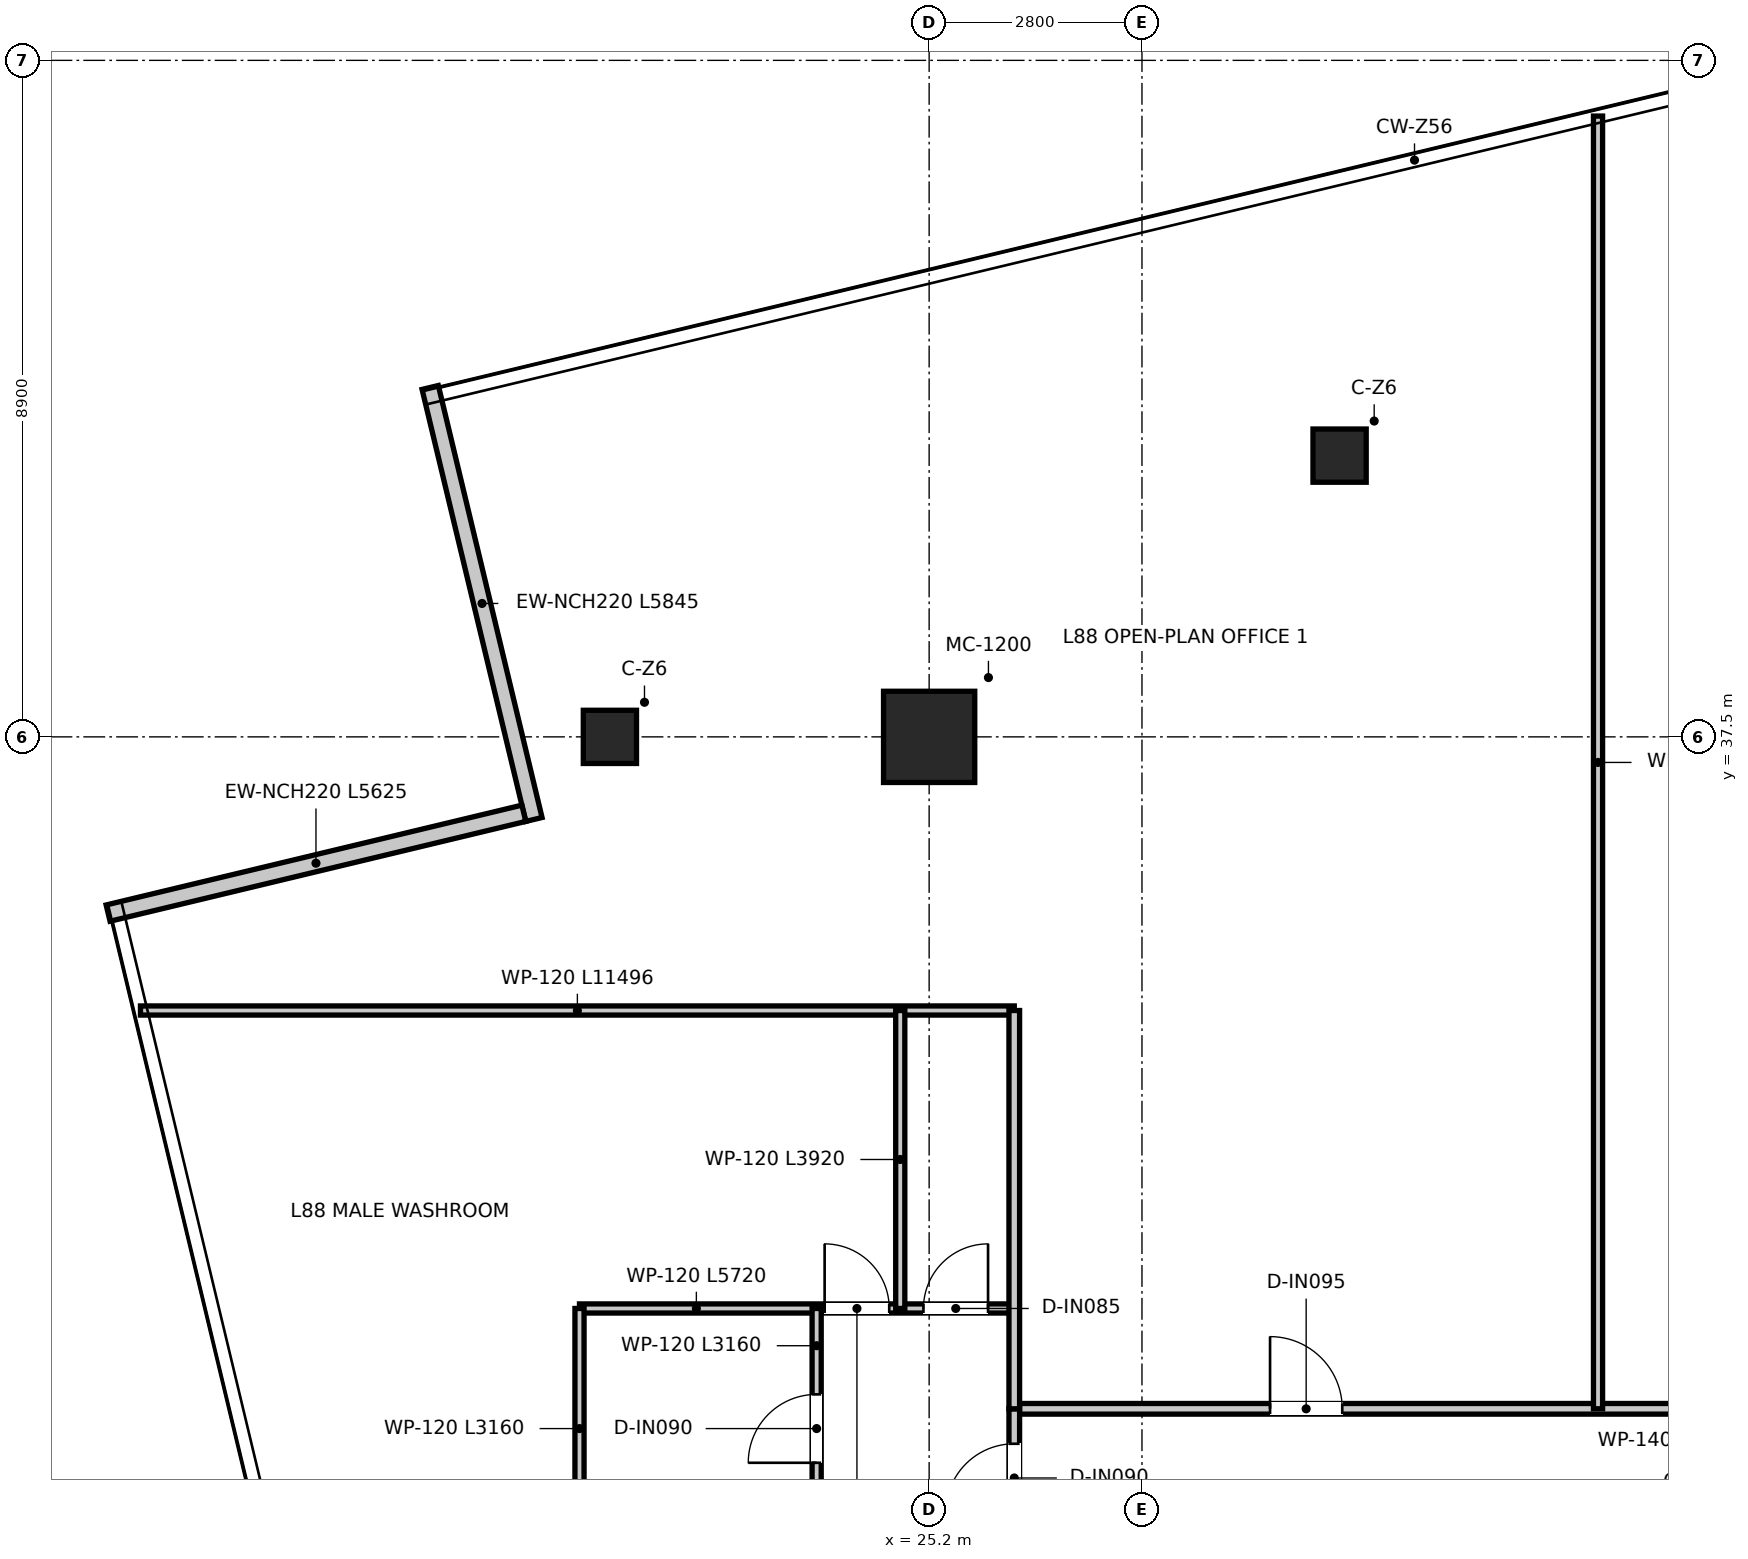
"""IFC4 building model, lengths in metres.
Left out: names, types, materials, properties, quantities, classifications, styles, units other than length and angle.
Written with IfcOpenShell. Run it as: python <this file> out.ifc"""

import sys

from ifc_helpers import new_model, si_unit, direction, frame, frame_2d, origin, origin_2d, place, context, subcontext, project, spatial, rectangle, extrude, source, transform, mapped, element, fill, save


model = new_model("IFC4")
c1 = context("Model", 3, precision=1e-05, world=origin(), true_north=direction((0.0, 1.0)))
c2 = subcontext(c1, "Body", "Model", "MODEL_VIEW")
j1 = project(units=[si_unit("LENGTHUNIT", "METRE"), si_unit("PLANEANGLEUNIT", "RADIAN")], contexts=[c1])
p1 = place(None, origin())
s1 = spatial("IfcSite", under=j1, at=p1, CompositionType="ELEMENT")
p2 = place(p1, origin())
s2 = spatial("IfcBuilding", under=s1, at=p2, CompositionType="ELEMENT")
p3 = place(p2, frame((0.0, 0.0, 359.3)))
s3 = spatial("IfcBuildingStorey", under=s2, at=p3, CompositionType="ELEMENT", Elevation=359.3)
m1 = source(origin(), c2, "Body", "SweptSolid", [
    extrude(rectangle(XDim=1.2, YDim=1.2, at=origin_2d()), origin(), (0.0, 0.0, 1.0), 3.95),
])
p4 = place(p3, frame((25.2, 37.5, 0.0), z_axis=(0.0, 0.0, 1.0), x_axis=(1.0, 0.0, 0.0)))
e1 = element("IfcColumn", 1, at=p4, inside=s3, PredefinedType="USERDEFINED", context=c2, shape_type="MappedRepresentation", body=[
    mapped(m1, transform((0.0, 0.0, 0.0), x_axis=(1.0, 0.0, 0.0), y_axis=(0.0, 1.0, 0.0), z_axis=(0.0, 0.0, 1.0), scale=1.0)),
])
m2 = source(origin(), c2, "Body", "SweptSolid", [
    extrude(rectangle(XDim=0.7, YDim=0.7, at=origin_2d()), origin(), (0.0, 0.0, 1.0), 3.95),
])
for number, where, z_axis, x_axis in (
    (2, (21.0, 37.5, 0.0), (0.0, 0.0, 1.0), (1.0, 0.0, 0.0)),
    (3, (30.6, 41.2, 0.0), (0.0, 0.0, 1.0), (1.0, 0.0, 0.0)),
):
    element("IfcColumn", number, at=place(p3, frame(where, z_axis=z_axis, x_axis=x_axis)), inside=s3, PredefinedType="COLUMN", context=c2, shape_type="MappedRepresentation", body=[
        mapped(m2, transform((0.0, 0.0, 0.0), x_axis=(1.0, 0.0, 0.0), y_axis=(0.0, 1.0, 0.0), z_axis=(0.0, 0.0, 1.0), scale=1.0)),
    ])
p5 = place(p3, frame((18.636, 42.097, 0.0), z_axis=(0.0, 0.0, 1.0), x_axis=(0.233444040416, -0.972370238126, 0.0)))
e4 = element("IfcWall", 4, at=p5, inside=s3, PredefinedType="ELEMENTEDWALL", context=c2, shape_type="SweptSolid", body=[
    extrude(rectangle(XDim=5.845, YDim=0.22, at=frame_2d((2.922, 0.0))), origin(), (0.0, 0.0, 1.0), 3.6),
])
p6 = place(p3, frame((19.868, 36.495, 0.0), z_axis=(0.0, 0.0, 1.0), x_axis=(-0.972364840687, -0.233466521361, 0.0)))
e5 = element("IfcWall", 5, at=p6, inside=s3, PredefinedType="ELEMENTEDWALL", context=c2, shape_type="SweptSolid", body=[
    extrude(rectangle(XDim=5.625, YDim=0.22, at=frame_2d((2.812, 0.0))), origin(), (0.0, 0.0, 1.0), 3.6),
])
p7 = place(p3, frame((26.32, 28.66, 0.0), z_axis=(0.0, 0.0, 1.0), x_axis=(1.0, 0.0, 0.0)))
e6 = element("IfcWall", 6, at=p7, inside=s3, PredefinedType="PARTITIONING", context=c2, shape_type="SweptSolid", body=[
    extrude(rectangle(XDim=19.36, YDim=0.14, at=frame_2d((9.68, 0.0))), origin(), (0.0, 0.0, 1.0), 3.11),
])
p8 = place(p7, frame((3.365, 0.0, 0.0)))
e7 = element("IfcOpeningElement", 7, at=p8, cuts=e6, PredefinedType="OPENING", context=c2, shape_type="SweptSolid", body=[
    extrude(rectangle(XDim=0.95, YDim=2.1, at=frame_2d((0.475, 1.05))), frame((0.0, 0.08, 0.0), z_axis=(0.0, -1.0, 0.0), x_axis=(1.0, 0.0, 0.0)), (0.0, 0.0, 1.0), 0.16),
])
p9 = place(p7, frame((13.045, 0.0, 0.0)))
e8 = element("IfcOpeningElement", 8, at=p9, cuts=e6, PredefinedType="OPENING", context=c2, shape_type="SweptSolid", body=[
    extrude(rectangle(XDim=0.95, YDim=2.1, at=frame_2d((0.475, 1.05))), frame((0.0, 0.08, 0.0), z_axis=(0.0, -1.0, 0.0), x_axis=(1.0, 0.0, 0.0)), (0.0, 0.0, 1.0), 0.16),
])
p10 = place(p3, frame((26.32, 13.0, 0.0), z_axis=(0.0, 0.0, 1.0), x_axis=(0.0, 1.0, 0.0)))
e9 = element("IfcWall", 9, at=p10, inside=s3, PredefinedType="PARTITIONING", context=c2, shape_type="SweptSolid", body=[
    extrude(rectangle(XDim=15.66, YDim=0.14, at=frame_2d((7.83, 0.0))), origin(), (0.0, 0.0, 1.0), 3.06),
])
p11 = place(p10, frame((14.3, 0.0, 0.0)))
e10 = element("IfcOpeningElement", 10, at=p11, cuts=e9, PredefinedType="OPENING", context=c2, shape_type="SweptSolid", body=[
    extrude(rectangle(XDim=0.9, YDim=2.1, at=frame_2d((0.45, 1.05))), frame((0.0, 0.08, 0.0), z_axis=(0.0, -1.0, 0.0), x_axis=(1.0, 0.0, 0.0)), (0.0, 0.0, 1.0), 0.16),
])
p12 = place(p10, frame((6.55, 0.0, 0.0)))
e11 = element("IfcOpeningElement", 11, at=p12, cuts=e9, PredefinedType="OPENING", context=c2, shape_type="SweptSolid", body=[
    extrude(rectangle(XDim=0.9, YDim=2.1, at=frame_2d((0.45, 1.05))), frame((0.0, 0.08, 0.0), z_axis=(0.0, -1.0, 0.0), x_axis=(1.0, 0.0, 0.0)), (0.0, 0.0, 1.0), 0.16),
])
p13 = place(p10, frame((11.21, 0.0, 0.0)))
e12 = element("IfcOpeningElement", 12, at=p13, cuts=e9, PredefinedType="OPENING", context=c2, shape_type="SweptSolid", body=[
    extrude(rectangle(XDim=0.9, YDim=2.1, at=frame_2d((0.45, 1.05))), frame((0.0, 0.08, 0.0), z_axis=(0.0, -1.0, 0.0), x_axis=(1.0, 0.0, 0.0)), (0.0, 0.0, 1.0), 0.16),
])
p14 = place(p3, frame((14.824, 33.9, 0.0), z_axis=(0.0, 0.0, 1.0), x_axis=(1.0, 0.0, 0.0)))
e13 = element("IfcWall", 13, at=p14, inside=s3, PredefinedType="PARTITIONING", context=c2, shape_type="SweptSolid", body=[
    extrude(rectangle(XDim=11.496, YDim=0.12, at=frame_2d((5.748, 0.0))), origin(), (0.0, 0.0, 1.0), 3.06),
])
p15 = place(p3, frame((20.6, 29.98, 0.0), z_axis=(0.0, 0.0, 1.0), x_axis=(1.0, 0.0, 0.0)))
e14 = element("IfcWall", 14, at=p15, inside=s3, PredefinedType="PARTITIONING", context=c2, shape_type="SweptSolid", body=[
    extrude(rectangle(XDim=5.72, YDim=0.12, at=frame_2d((2.86, 0.0))), origin(), (0.0, 0.0, 1.0), 3.06),
])
p16 = place(p15, frame((3.225, 0.0, 0.0)))
e15 = element("IfcOpeningElement", 15, at=p16, cuts=e14, PredefinedType="OPENING", context=c2, shape_type="SweptSolid", body=[
    extrude(rectangle(XDim=0.85, YDim=2.1, at=frame_2d((0.425, 1.05))), frame((0.0, 0.07, 0.0), z_axis=(0.0, -1.0, 0.0), x_axis=(1.0, 0.0, 0.0)), (0.0, 0.0, 1.0), 0.14),
])
p17 = place(p15, frame((4.525, 0.0, 0.0)))
e16 = element("IfcOpeningElement", 16, at=p17, cuts=e14, PredefinedType="OPENING", context=c2, shape_type="SweptSolid", body=[
    extrude(rectangle(XDim=0.85, YDim=2.1, at=frame_2d((0.425, 1.05))), frame((0.0, 0.07, 0.0), z_axis=(0.0, -1.0, 0.0), x_axis=(1.0, 0.0, 0.0)), (0.0, 0.0, 1.0), 0.14),
])
p18 = place(p3, frame((20.6, 26.82, 0.0), z_axis=(0.0, 0.0, 1.0), x_axis=(0.0, 1.0, 0.0)))
e17 = element("IfcWall", 17, at=p18, inside=s3, PredefinedType="PARTITIONING", context=c2, shape_type="SweptSolid", body=[
    extrude(rectangle(XDim=3.16, YDim=0.12, at=frame_2d((1.58, 0.0))), origin(), (0.0, 0.0, 1.0), 3.6),
])
p19 = place(p3, frame((23.72, 26.82, 0.0), z_axis=(0.0, 0.0, 1.0), x_axis=(0.0, 1.0, 0.0)))
e18 = element("IfcWall", 18, at=p19, inside=s3, PredefinedType="PARTITIONING", context=c2, shape_type="SweptSolid", body=[
    extrude(rectangle(XDim=3.16, YDim=0.12, at=frame_2d((1.58, 0.0))), origin(), (0.0, 0.0, 1.0), 3.11),
])
p20 = place(p19, frame((1.13, 0.0, 0.0)))
e19 = element("IfcOpeningElement", 19, at=p20, cuts=e18, PredefinedType="OPENING", context=c2, shape_type="SweptSolid", body=[
    extrude(rectangle(XDim=0.9, YDim=2.1, at=frame_2d((0.45, 1.05))), frame((0.0, 0.07, 0.0), z_axis=(0.0, -1.0, 0.0), x_axis=(1.0, 0.0, 0.0)), (0.0, 0.0, 1.0), 0.14),
])
p21 = place(p3, frame((24.82, 29.98, 0.0), z_axis=(0.0, 0.0, 1.0), x_axis=(0.0, 1.0, 0.0)))
e20 = element("IfcWall", 20, at=p21, inside=s3, PredefinedType="PARTITIONING", context=c2, shape_type="SweptSolid", body=[
    extrude(rectangle(XDim=3.92, YDim=0.12, at=frame_2d((1.96, 0.0))), origin(), (0.0, 0.0, 1.0), 3.3),
])
p22 = place(p3, frame((26.32, 28.66, 0.0), z_axis=(0.0, 0.0, 1.0), x_axis=(0.0, 1.0, 0.0)))
e21 = element("IfcWall", 21, at=p22, inside=s3, PredefinedType="PARTITIONING", context=c2, shape_type="SweptSolid", body=[
    extrude(rectangle(XDim=5.24, YDim=0.14, at=frame_2d((2.62, 0.0))), origin(), (0.0, 0.0, 1.0), 3.36),
])
p23 = place(p3, frame((34.0, 28.66, 0.0), z_axis=(0.0, 0.0, 1.0), x_axis=(0.0, 1.0, 0.0)))
e22 = element("IfcWall", 22, at=p23, inside=s3, PredefinedType="PARTITIONING", context=c2, shape_type="SweptSolid", body=[
    extrude(rectangle(XDim=17.007, YDim=0.12, at=frame_2d((8.504, 0.0))), origin(), (0.0, 0.0, 1.0), 3.06),
])
p24 = place(p11, origin())
e23 = element("IfcDoor", 23, at=p24, inside=s3, OperationType="SINGLE_SWING_LEFT", PredefinedType="DOOR", context=c2, shape_type="SweptSolid", body=[
    extrude(rectangle(XDim=0.9, YDim=2.1, at=frame_2d((0.45, 1.05))), frame((0.0, 0.025, 0.0), z_axis=(0.0, -1.0, 0.0), x_axis=(1.0, 0.0, 0.0)), (0.0, 0.0, 1.0), 0.05),
])
fill(e10, e23)
p25 = place(p16, origin())
e24 = element("IfcDoor", 24, at=p25, inside=s3, OperationType="SINGLE_SWING_LEFT", PredefinedType="DOOR", context=c2, shape_type="SweptSolid", body=[
    extrude(rectangle(XDim=0.85, YDim=2.1, at=frame_2d((0.425, 1.05))), frame((0.0, 0.025, 0.0), z_axis=(0.0, -1.0, 0.0), x_axis=(1.0, 0.0, 0.0)), (0.0, 0.0, 1.0), 0.05),
])
fill(e15, e24)
p26 = place(p17, origin())
e25 = element("IfcDoor", 25, at=p26, inside=s3, OperationType="SINGLE_SWING_RIGHT", PredefinedType="DOOR", context=c2, shape_type="SweptSolid", body=[
    extrude(rectangle(XDim=0.85, YDim=2.1, at=frame_2d((0.425, 1.05))), frame((0.0, 0.025, 0.0), z_axis=(0.0, -1.0, 0.0), x_axis=(1.0, 0.0, 0.0)), (0.0, 0.0, 1.0), 0.05),
])
fill(e16, e25)
p27 = place(p20, origin())
e26 = element("IfcDoor", 26, at=p27, inside=s3, OperationType="SINGLE_SWING_LEFT", PredefinedType="DOOR", context=c2, shape_type="SweptSolid", body=[
    extrude(rectangle(XDim=0.9, YDim=2.1, at=frame_2d((0.45, 1.05))), frame((0.0, 0.025, 0.0), z_axis=(0.0, -1.0, 0.0), x_axis=(1.0, 0.0, 0.0)), (0.0, 0.0, 1.0), 0.05),
])
fill(e19, e26)
p28 = place(p8, origin())
e27 = element("IfcDoor", 27, at=p28, inside=s3, OperationType="SINGLE_SWING_LEFT", PredefinedType="DOOR", context=c2, shape_type="SweptSolid", body=[
    extrude(rectangle(XDim=0.95, YDim=2.1, at=frame_2d((0.475, 1.05))), frame((0.0, 0.025, 0.0), z_axis=(0.0, -1.0, 0.0), x_axis=(1.0, 0.0, 0.0)), (0.0, 0.0, 1.0), 0.05),
])
fill(e7, e27)
save(model, sys.argv[1])
